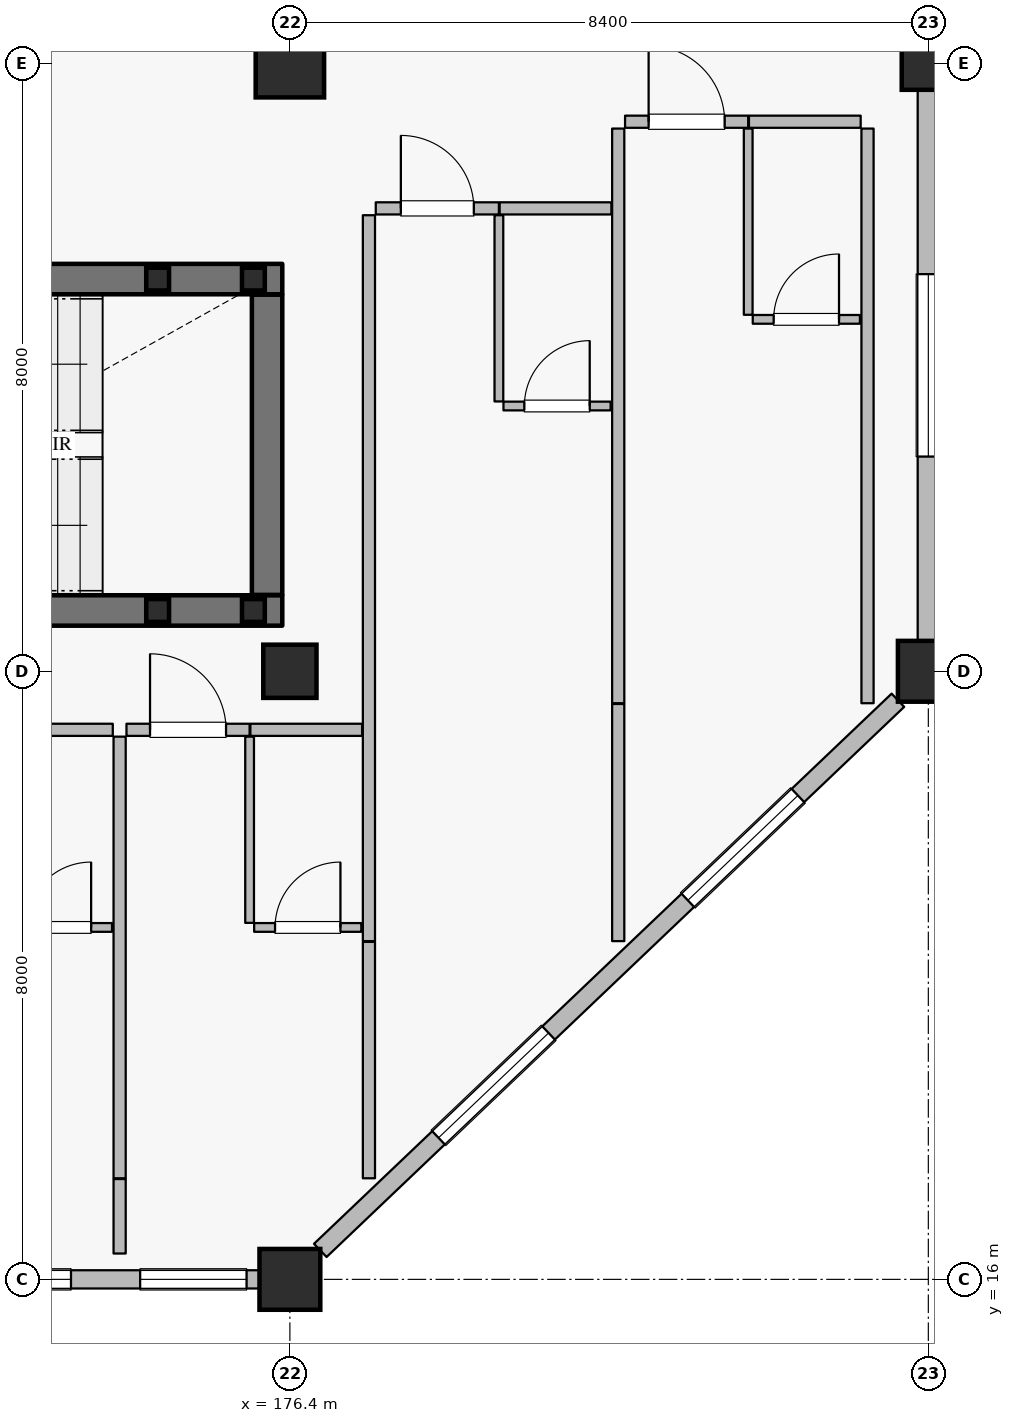
"""IFC4 building model, lengths in metres.
Left out: names, types, materials, properties, quantities, classifications, styles, units other than length and angle.
Written with IfcOpenShell. Run it as: python <this file> out.ifc"""

import sys

from ifc_helpers import new_model, si_unit, direction, frame, frame_2d, origin, origin_2d, place, context, subcontext, project, spatial, rectangle, hollow_rectangle, extrude, element, fill, save


model = new_model("IFC4")
c1 = context("Model", 3, precision=1e-05, world=origin(), true_north=direction((0.0, 1.0)))
c2 = subcontext(c1, "Body", "Model", "MODEL_VIEW")
j1 = project(units=[si_unit("LENGTHUNIT", "METRE"), si_unit("PLANEANGLEUNIT", "RADIAN")], contexts=[c1])
p1 = place(None, origin())
s1 = spatial("IfcSite", under=j1, at=p1, CompositionType="ELEMENT")
p2 = place(p1, origin())
s2 = spatial("IfcBuilding", under=s1, at=p2, CompositionType="ELEMENT")
p3 = place(p2, frame((0.0, 0.0, 16.2)))
s3 = spatial("IfcBuildingStorey", under=s2, at=p3, CompositionType="ELEMENT", Elevation=16.2)
p4 = place(p3, frame((176.4, 16.0, 0.0), z_axis=(0.0, 0.0, 1.0), x_axis=(1.0, 0.0, 0.0)))
e1 = element("IfcColumn", 1, at=p4, inside=s3, PredefinedType="COLUMN", context=c2, shape_type="SweptSolid", body=[
    extrude(rectangle(XDim=0.8, YDim=0.8, at=origin_2d()), origin(), (0.0, 0.0, 1.0), 4.8),
])
p5 = place(p3, frame((176.4, 32.0, 0.0), z_axis=(0.0, 0.0, 1.0), x_axis=(1.0, 0.0, 0.0)))
e2 = element("IfcColumn", 2, at=p5, inside=s3, PredefinedType="COLUMN", context=c2, shape_type="SweptSolid", body=[
    extrude(rectangle(XDim=0.9, YDim=0.9, at=origin_2d()), origin(), (0.0, 0.0, 1.0), 4.8),
])
p6 = place(p3, frame((184.8, 24.0, 0.0), z_axis=(0.0, 0.0, 1.0), x_axis=(1.0, 0.0, 0.0)))
e3 = element("IfcColumn", 3, at=p6, inside=s3, PredefinedType="COLUMN", context=c2, shape_type="SweptSolid", body=[
    extrude(rectangle(XDim=0.8, YDim=0.8, at=origin_2d()), origin(), (0.0, 0.0, 1.0), 4.8),
])
for number, where, z_axis, x_axis in (
    (4, (176.4, 24.0, 0.0), (0.0, 0.0, 1.0), (1.0, 0.0, 0.0)),
    (5, (184.8, 32.0, 0.0), (0.0, 0.0, 1.0), (1.0, 0.0, 0.0)),
):
    element("IfcColumn", number, at=place(p3, frame(where, z_axis=z_axis, x_axis=x_axis)), inside=s3, PredefinedType="COLUMN", context=c2, shape_type="SweptSolid", body=[
        extrude(rectangle(XDim=0.7, YDim=0.7, at=origin_2d()), origin(), (0.0, 0.0, 1.0), 4.8),
    ])
p7 = place(p3, frame((176.0, 16.0, 0.0), z_axis=(0.0, 0.0, 1.0), x_axis=(-1.0, 0.0, 0.0)))
e6 = element("IfcWall", 6, at=p7, inside=s3, PredefinedType="SOLIDWALL", context=c2, shape_type="SweptSolid", body=[
    extrude(rectangle(XDim=7.6, YDim=0.24, at=frame_2d((3.8, 0.0))), origin(), (0.0, 0.0, 1.0), 4.13),
])
p8 = place(p7, frame((0.17, 0.0, 0.8)))
e7 = element("IfcOpeningElement", 7, at=p8, cuts=e6, PredefinedType="OPENING", context=c2, shape_type="SweptSolid", body=[
    extrude(rectangle(XDim=1.4, YDim=1.6, at=frame_2d((0.7, 0.8))), frame((0.0, 0.13, 0.0), z_axis=(0.0, -1.0, 0.0), x_axis=(1.0, 0.0, 0.0)), (0.0, 0.0, 1.0), 0.26),
])
p9 = place(p7, frame((2.48, 0.0, 0.8)))
e8 = element("IfcOpeningElement", 8, at=p9, cuts=e6, PredefinedType="OPENING", context=c2, shape_type="SweptSolid", body=[
    extrude(rectangle(XDim=2.0, YDim=1.75, at=frame_2d((1.0, 0.875))), frame((0.0, 0.13, 0.0), z_axis=(0.0, -1.0, 0.0), x_axis=(1.0, 0.0, 0.0)), (0.0, 0.0, 1.0), 0.26),
])
p10 = place(p7, frame((5.41, 0.0, 0.8)))
e9 = element("IfcOpeningElement", 9, at=p10, cuts=e6, PredefinedType="OPENING", context=c2, shape_type="SweptSolid", body=[
    extrude(rectangle(XDim=2.0, YDim=1.75, at=frame_2d((1.0, 0.875))), frame((0.0, 0.13, 0.0), z_axis=(0.0, -1.0, 0.0), x_axis=(1.0, 0.0, 0.0)), (0.0, 0.0, 1.0), 0.26),
])
p11 = place(p3, frame((184.4, 23.619, 0.0), z_axis=(0.0, 0.0, 1.0), x_axis=(-0.724145676014, -0.689647040094, 0.0)))
e10 = element("IfcWall", 10, at=p11, inside=s3, PredefinedType="SOLIDWALL", context=c2, shape_type="SweptSolid", body=[
    extrude(rectangle(XDim=10.495, YDim=0.24, at=frame_2d((5.248, 0.0))), origin(), (0.0, 0.0, 1.0), 4.13),
])
p12 = place(p11, frame((1.817, 0.0, 0.8)))
e11 = element("IfcOpeningElement", 11, at=p12, cuts=e10, PredefinedType="OPENING", context=c2, shape_type="SweptSolid", body=[
    extrude(rectangle(XDim=2.0, YDim=1.75, at=frame_2d((1.0, 0.875))), frame((0.0, 0.13, 0.0), z_axis=(0.0, -1.0, 0.0), x_axis=(1.0, 0.0, 0.0)), (0.0, 0.0, 1.0), 0.26),
])
p13 = place(p11, frame((6.347, 0.0, 0.8)))
e12 = element("IfcOpeningElement", 12, at=p13, cuts=e10, PredefinedType="OPENING", context=c2, shape_type="SweptSolid", body=[
    extrude(rectangle(XDim=2.0, YDim=1.75, at=frame_2d((1.0, 0.875))), frame((0.0, 0.13, 0.0), z_axis=(0.0, -1.0, 0.0), x_axis=(1.0, 0.0, 0.0)), (0.0, 0.0, 1.0), 0.26),
])
p14 = place(p3, frame((184.8, 31.65, 0.0), z_axis=(0.0, 0.0, 1.0), x_axis=(0.0, -1.0, 0.0)))
e13 = element("IfcWall", 13, at=p14, inside=s3, PredefinedType="SOLIDWALL", context=c2, shape_type="SweptSolid", body=[
    extrude(rectangle(XDim=7.25, YDim=0.28, at=frame_2d((3.625, 0.0))), origin(), (0.0, 0.0, 1.0), 3.9),
])
p15 = place(p14, frame((2.425, 0.0, 0.75)))
e14 = element("IfcOpeningElement", 14, at=p15, cuts=e13, PredefinedType="OPENING", context=c2, shape_type="SweptSolid", body=[
    extrude(rectangle(XDim=2.4, YDim=1.65, at=frame_2d((1.2, 0.825))), frame((0.0, 0.15, 0.0), z_axis=(0.0, -1.0, 0.0), x_axis=(1.0, 0.0, 0.0)), (0.0, 0.0, 1.0), 0.3),
])
p16 = place(p3, frame((168.1, 24.8, 0.0), z_axis=(0.0, 0.0, 1.0), x_axis=(1.0, 0.0, 0.0)))
e15 = element("IfcWall", 15, at=p16, inside=s3, PredefinedType="SHEAR", context=c2, shape_type="SweptSolid", body=[
    extrude(rectangle(XDim=8.2, YDim=0.4, at=frame_2d((4.1, 0.0))), origin(), (0.0, 0.0, 1.0), 4.535),
])
p17 = place(p3, frame((176.1, 25.005, 0.0), z_axis=(0.0, 0.0, 1.0), x_axis=(0.0, 1.0, 0.0)))
e16 = element("IfcWall", 16, at=p17, inside=s3, PredefinedType="SHEAR", context=c2, shape_type="SweptSolid", body=[
    extrude(rectangle(XDim=3.95, YDim=0.4, at=frame_2d((1.975, 0.0))), origin(), (0.0, 0.0, 1.0), 4.535),
])
p18 = place(p3, frame((168.1, 29.16, 0.0), z_axis=(0.0, 0.0, 1.0), x_axis=(1.0, 0.0, 0.0)))
e17 = element("IfcWall", 17, at=p18, inside=s3, PredefinedType="SHEAR", context=c2, shape_type="SweptSolid", body=[
    extrude(rectangle(XDim=8.2, YDim=0.4, at=frame_2d((4.1, 0.0))), origin(), (0.0, 0.0, 1.0), 4.535),
])
p19 = place(p18, frame((0.43, 0.0, 0.0)))
e18 = element("IfcOpeningElement", 18, at=p19, cuts=e17, PredefinedType="OPENING", context=c2, shape_type="SweptSolid", body=[
    extrude(rectangle(XDim=1.16, YDim=2.2, at=frame_2d((0.58, 1.1))), frame((0.0, 0.21, 0.0), z_axis=(0.0, -1.0, 0.0), x_axis=(1.0, 0.0, 0.0)), (0.0, 0.0, 1.0), 0.42),
])
for number, where, z_axis, x_axis in (
    (19, (174.66, 24.8, -2.4), (0.0, 0.0, 1.0), (1.0, 0.0, 0.0)),
    (20, (174.66, 29.16, -2.4), (0.0, 0.0, 1.0), (1.0, 0.0, 0.0)),
    (21, (175.92, 24.8, -2.4), (0.0, 0.0, 1.0), (1.0, 0.0, 0.0)),
    (22, (175.92, 29.16, -2.4), (0.0, 0.0, 1.0), (1.0, 0.0, 0.0)),
):
    element("IfcColumn", number, at=place(p3, frame(where, z_axis=z_axis, x_axis=x_axis)), inside=s3, PredefinedType="COLUMN", context=c2, shape_type="SweptSolid", body=[
        extrude(hollow_rectangle(XDim=0.3, YDim=0.3, WallThickness=0.012, at=origin_2d()), origin(), (0.0, 0.0, 1.0), 4.62),
    ])
p20 = place(p3, frame((172.6, 23.23, 0.0), z_axis=(0.0, 0.0, 1.0), x_axis=(1.0, 0.0, 0.0)))
e23 = element("IfcWall", 23, at=p20, inside=s3, PredefinedType="PARTITIONING", context=c2, shape_type="SweptSolid", body=[
    extrude(rectangle(XDim=1.47, YDim=0.16, at=frame_2d((0.735, 0.0))), origin(), (0.0, 0.0, 1.0), 4.535),
])
p21 = place(p3, frame((172.65, 20.63, 0.0), z_axis=(0.0, 0.0, 1.0), x_axis=(1.0, 0.0, 0.0)))
e24 = element("IfcWall", 24, at=p21, inside=s3, PredefinedType="PARTITIONING", context=c2, shape_type="SweptSolid", body=[
    extrude(rectangle(XDim=1.41, YDim=0.115, at=frame_2d((0.705, 0.0))), origin(), (0.0, 0.0, 1.0), 4.535),
])
p22 = place(p21, frame((0.275, 0.0, 0.0)))
e25 = element("IfcOpeningElement", 25, at=p22, cuts=e24, PredefinedType="OPENING", context=c2, shape_type="SweptSolid", body=[
    extrude(rectangle(XDim=0.86, YDim=2.12, at=frame_2d((0.43, 1.06))), frame((0.0, 0.067, 0.0), z_axis=(0.0, -1.0, 0.0), x_axis=(1.0, 0.0, 0.0)), (0.0, 0.0, 1.0), 0.135),
])
p23 = place(p3, frame((174.16, 16.34, 0.0), z_axis=(0.0, 0.0, 1.0), x_axis=(0.0, 1.0, 0.0)))
e26 = element("IfcWall", 26, at=p23, inside=s3, PredefinedType="PARTITIONING", context=c2, shape_type="SweptSolid", body=[
    extrude(rectangle(XDim=0.98, YDim=0.16, at=frame_2d((0.49, 0.0))), origin(), (0.0, 0.0, 1.0), 4.535),
])
p24 = place(p3, frame((174.25, 23.23, 0.0), z_axis=(0.0, 0.0, 1.0), x_axis=(1.0, 0.0, 0.0)))
e27 = element("IfcWall", 27, at=p24, inside=s3, PredefinedType="PARTITIONING", context=c2, shape_type="SweptSolid", body=[
    extrude(rectangle(XDim=1.62, YDim=0.16, at=frame_2d((0.81, 0.0))), origin(), (0.0, 0.0, 1.0), 4.535),
])
p25 = place(p24, frame((0.31, 0.0, 0.0)))
e28 = element("IfcOpeningElement", 28, at=p25, cuts=e27, PredefinedType="OPENING", context=c2, shape_type="SweptSolid", body=[
    extrude(rectangle(XDim=1.0, YDim=2.25, at=frame_2d((0.5, 1.125))), frame((0.0, 0.09, 0.0), z_axis=(0.0, -1.0, 0.0), x_axis=(1.0, 0.0, 0.0)), (0.0, 0.0, 1.0), 0.18),
])
p26 = place(p3, frame((175.88, 23.23, 0.0), z_axis=(0.0, 0.0, 1.0), x_axis=(1.0, 0.0, 0.0)))
e29 = element("IfcWall", 29, at=p26, inside=s3, PredefinedType="PARTITIONING", context=c2, shape_type="SweptSolid", body=[
    extrude(rectangle(XDim=1.47, YDim=0.16, at=frame_2d((0.735, 0.0))), origin(), (0.0, 0.0, 1.0), 4.535),
])
p27 = place(p3, frame((175.87, 20.69, 0.0), z_axis=(0.0, 0.0, 1.0), x_axis=(0.0, 1.0, 0.0)))
e30 = element("IfcWall", 30, at=p27, inside=s3, PredefinedType="PARTITIONING", context=c2, shape_type="SweptSolid", body=[
    extrude(rectangle(XDim=2.45, YDim=0.115, at=frame_2d((1.225, 0.0))), origin(), (0.0, 0.0, 1.0), 4.535),
])
p28 = place(p3, frame((175.93, 20.63, 0.0), z_axis=(0.0, 0.0, 1.0), x_axis=(1.0, 0.0, 0.0)))
e31 = element("IfcWall", 31, at=p28, inside=s3, PredefinedType="PARTITIONING", context=c2, shape_type="SweptSolid", body=[
    extrude(rectangle(XDim=1.41, YDim=0.115, at=frame_2d((0.705, 0.0))), origin(), (0.0, 0.0, 1.0), 4.535),
])
p29 = place(p28, frame((0.275, 0.0, 0.0)))
e32 = element("IfcOpeningElement", 32, at=p29, cuts=e31, PredefinedType="OPENING", context=c2, shape_type="SweptSolid", body=[
    extrude(rectangle(XDim=0.86, YDim=2.12, at=frame_2d((0.43, 1.06))), frame((0.0, 0.067, 0.0), z_axis=(0.0, -1.0, 0.0), x_axis=(1.0, 0.0, 0.0)), (0.0, 0.0, 1.0), 0.135),
])
p30 = place(p3, frame((174.16, 17.33, 0.0), z_axis=(0.0, 0.0, 1.0), x_axis=(0.0, 1.0, 0.0)))
e33 = element("IfcWall", 33, at=p30, inside=s3, PredefinedType="PARTITIONING", context=c2, shape_type="SweptSolid", body=[
    extrude(rectangle(XDim=5.81, YDim=0.16, at=frame_2d((2.905, 0.0))), origin(), (0.0, 0.0, 1.0), 4.535),
])
p31 = place(p3, frame((177.44, 17.33, 0.0), z_axis=(0.0, 0.0, 1.0), x_axis=(0.0, 1.0, 0.0)))
e34 = element("IfcWall", 34, at=p31, inside=s3, PredefinedType="PARTITIONING", context=c2, shape_type="SweptSolid", body=[
    extrude(rectangle(XDim=3.11, YDim=0.16, at=frame_2d((1.555, 0.0))), origin(), (0.0, 0.0, 1.0), 4.535),
])
p32 = place(p3, frame((177.53, 30.09, 0.0), z_axis=(0.0, 0.0, 1.0), x_axis=(1.0, 0.0, 0.0)))
e35 = element("IfcWall", 35, at=p32, inside=s3, PredefinedType="PARTITIONING", context=c2, shape_type="SweptSolid", body=[
    extrude(rectangle(XDim=1.62, YDim=0.16, at=frame_2d((0.81, 0.0))), origin(), (0.0, 0.0, 1.0), 4.535),
])
p33 = place(p32, frame((0.33, 0.0, 0.0)))
e36 = element("IfcOpeningElement", 36, at=p33, cuts=e35, PredefinedType="OPENING", context=c2, shape_type="SweptSolid", body=[
    extrude(rectangle(XDim=0.96, YDim=2.2, at=frame_2d((0.48, 1.1))), frame((0.0, 0.09, 0.0), z_axis=(0.0, -1.0, 0.0), x_axis=(1.0, 0.0, 0.0)), (0.0, 0.0, 1.0), 0.18),
])
p34 = place(p3, frame((179.16, 30.09, 0.0), z_axis=(0.0, 0.0, 1.0), x_axis=(1.0, 0.0, 0.0)))
e37 = element("IfcWall", 37, at=p34, inside=s3, PredefinedType="PARTITIONING", context=c2, shape_type="SweptSolid", body=[
    extrude(rectangle(XDim=1.47, YDim=0.16, at=frame_2d((0.735, 0.0))), origin(), (0.0, 0.0, 1.0), 4.535),
])
p35 = place(p3, frame((179.15, 27.55, 0.0), z_axis=(0.0, 0.0, 1.0), x_axis=(0.0, 1.0, 0.0)))
e38 = element("IfcWall", 38, at=p35, inside=s3, PredefinedType="PARTITIONING", context=c2, shape_type="SweptSolid", body=[
    extrude(rectangle(XDim=2.45, YDim=0.115, at=frame_2d((1.225, 0.0))), origin(), (0.0, 0.0, 1.0), 4.535),
])
p36 = place(p3, frame((179.21, 27.49, 0.0), z_axis=(0.0, 0.0, 1.0), x_axis=(1.0, 0.0, 0.0)))
e39 = element("IfcWall", 39, at=p36, inside=s3, PredefinedType="PARTITIONING", context=c2, shape_type="SweptSolid", body=[
    extrude(rectangle(XDim=1.41, YDim=0.115, at=frame_2d((0.705, 0.0))), origin(), (0.0, 0.0, 1.0), 4.535),
])
p37 = place(p36, frame((0.275, 0.0, 0.0)))
e40 = element("IfcOpeningElement", 40, at=p37, cuts=e39, PredefinedType="OPENING", context=c2, shape_type="SweptSolid", body=[
    extrude(rectangle(XDim=0.86, YDim=2.12, at=frame_2d((0.43, 1.06))), frame((0.0, 0.067, 0.0), z_axis=(0.0, -1.0, 0.0), x_axis=(1.0, 0.0, 0.0)), (0.0, 0.0, 1.0), 0.135),
])
p38 = place(p3, frame((177.44, 20.45, 0.0), z_axis=(0.0, 0.0, 1.0), x_axis=(0.0, 1.0, 0.0)))
e41 = element("IfcWall", 41, at=p38, inside=s3, PredefinedType="PARTITIONING", context=c2, shape_type="SweptSolid", body=[
    extrude(rectangle(XDim=9.55, YDim=0.16, at=frame_2d((4.775, 0.0))), origin(), (0.0, 0.0, 1.0), 4.535),
])
p39 = place(p3, frame((180.72, 20.45, 0.0), z_axis=(0.0, 0.0, 1.0), x_axis=(0.0, 1.0, 0.0)))
e42 = element("IfcWall", 42, at=p39, inside=s3, PredefinedType="PARTITIONING", context=c2, shape_type="SweptSolid", body=[
    extrude(rectangle(XDim=3.12, YDim=0.16, at=frame_2d((1.56, 0.0))), origin(), (0.0, 0.0, 1.0), 4.535),
])
p40 = place(p3, frame((180.81, 31.23, 0.0), z_axis=(0.0, 0.0, 1.0), x_axis=(1.0, 0.0, 0.0)))
e43 = element("IfcWall", 43, at=p40, inside=s3, PredefinedType="PARTITIONING", context=c2, shape_type="SweptSolid", body=[
    extrude(rectangle(XDim=1.62, YDim=0.16, at=frame_2d((0.81, 0.0))), origin(), (0.0, 0.0, 1.0), 4.535),
])
p41 = place(p40, frame((0.31, 0.0, 0.0)))
e44 = element("IfcOpeningElement", 44, at=p41, cuts=e43, PredefinedType="OPENING", context=c2, shape_type="SweptSolid", body=[
    extrude(rectangle(XDim=1.0, YDim=2.25, at=frame_2d((0.5, 1.125))), frame((0.0, 0.09, 0.0), z_axis=(0.0, -1.0, 0.0), x_axis=(1.0, 0.0, 0.0)), (0.0, 0.0, 1.0), 0.18),
])
p42 = place(p3, frame((182.44, 31.23, 0.0), z_axis=(0.0, 0.0, 1.0), x_axis=(1.0, 0.0, 0.0)))
e45 = element("IfcWall", 45, at=p42, inside=s3, PredefinedType="PARTITIONING", context=c2, shape_type="SweptSolid", body=[
    extrude(rectangle(XDim=1.47, YDim=0.16, at=frame_2d((0.735, 0.0))), origin(), (0.0, 0.0, 1.0), 4.535),
])
p43 = place(p3, frame((182.43, 28.69, 0.0), z_axis=(0.0, 0.0, 1.0), x_axis=(0.0, 1.0, 0.0)))
e46 = element("IfcWall", 46, at=p43, inside=s3, PredefinedType="PARTITIONING", context=c2, shape_type="SweptSolid", body=[
    extrude(rectangle(XDim=2.45, YDim=0.115, at=frame_2d((1.225, 0.0))), origin(), (0.0, 0.0, 1.0), 4.535),
])
p44 = place(p3, frame((182.49, 28.63, 0.0), z_axis=(0.0, 0.0, 1.0), x_axis=(1.0, 0.0, 0.0)))
e47 = element("IfcWall", 47, at=p44, inside=s3, PredefinedType="PARTITIONING", context=c2, shape_type="SweptSolid", body=[
    extrude(rectangle(XDim=1.41, YDim=0.115, at=frame_2d((0.705, 0.0))), origin(), (0.0, 0.0, 1.0), 4.535),
])
p45 = place(p44, frame((0.275, 0.0, 0.0)))
e48 = element("IfcOpeningElement", 48, at=p45, cuts=e47, PredefinedType="OPENING", context=c2, shape_type="SweptSolid", body=[
    extrude(rectangle(XDim=0.86, YDim=2.12, at=frame_2d((0.43, 1.06))), frame((0.0, 0.067, 0.0), z_axis=(0.0, -1.0, 0.0), x_axis=(1.0, 0.0, 0.0)), (0.0, 0.0, 1.0), 0.135),
])
for number, where, z_axis, x_axis in (
    (49, (180.72, 23.58, 0.0), (0.0, 0.0, 1.0), (0.0, 1.0, 0.0)),
    (50, (184.0, 23.58, 0.0), (0.0, 0.0, 1.0), (0.0, 1.0, 0.0)),
):
    element("IfcWall", number, at=place(p3, frame(where, z_axis=z_axis, x_axis=x_axis)), inside=s3, PredefinedType="PARTITIONING", context=c2, shape_type="SweptSolid", body=[
        extrude(rectangle(XDim=7.56, YDim=0.16, at=frame_2d((3.78, 0.0))), origin(), (0.0, 0.0, 1.0), 4.535),
    ])
p46 = place(p8, origin())
e51 = element("IfcWindow", 51, at=p46, inside=s3, PartitioningType="SINGLE_PANEL", PredefinedType="WINDOW", context=c2, shape_type="SweptSolid", body=[
    extrude(rectangle(XDim=1.4, YDim=1.6, at=frame_2d((0.7, 0.8))), frame((0.0, 0.03, 0.0), z_axis=(0.0, -1.0, 0.0), x_axis=(1.0, 0.0, 0.0)), (0.0, 0.0, 1.0), 0.06),
])
fill(e7, e51)
p47 = place(p9, origin())
e52 = element("IfcWindow", 52, at=p47, inside=s3, PartitioningType="DOUBLE_PANEL_VERTICAL", PredefinedType="WINDOW", context=c2, shape_type="SweptSolid", body=[
    extrude(rectangle(XDim=2.0, YDim=1.75, at=frame_2d((1.0, 0.875))), frame((0.0, 0.03, 0.0), z_axis=(0.0, -1.0, 0.0), x_axis=(1.0, 0.0, 0.0)), (0.0, 0.0, 1.0), 0.06),
])
fill(e8, e52)
p48 = place(p12, origin())
e53 = element("IfcWindow", 53, at=p48, inside=s3, PartitioningType="DOUBLE_PANEL_VERTICAL", PredefinedType="WINDOW", context=c2, shape_type="SweptSolid", body=[
    extrude(rectangle(XDim=2.0, YDim=1.75, at=frame_2d((1.0, 0.875))), frame((0.0, 0.03, 0.0), z_axis=(0.0, -1.0, 0.0), x_axis=(1.0, 0.0, 0.0)), (0.0, 0.0, 1.0), 0.06),
])
fill(e11, e53)
p49 = place(p13, origin())
e54 = element("IfcWindow", 54, at=p49, inside=s3, PartitioningType="DOUBLE_PANEL_VERTICAL", PredefinedType="WINDOW", context=c2, shape_type="SweptSolid", body=[
    extrude(rectangle(XDim=2.0, YDim=1.75, at=frame_2d((1.0, 0.875))), frame((0.0, 0.03, 0.0), z_axis=(0.0, -1.0, 0.0), x_axis=(1.0, 0.0, 0.0)), (0.0, 0.0, 1.0), 0.06),
])
fill(e12, e54)
p50 = place(p15, origin())
e55 = element("IfcWindow", 55, at=p50, inside=s3, PartitioningType="DOUBLE_PANEL_VERTICAL", PredefinedType="WINDOW", context=c2, shape_type="SweptSolid", body=[
    extrude(rectangle(XDim=2.4, YDim=1.65, at=frame_2d((1.2, 0.825))), frame((0.0, 0.03, 0.0), z_axis=(0.0, -1.0, 0.0), x_axis=(1.0, 0.0, 0.0)), (0.0, 0.0, 1.0), 0.06),
])
fill(e14, e55)
p51 = place(p22, origin())
e56 = element("IfcDoor", 56, at=p51, inside=s3, OperationType="SINGLE_SWING_RIGHT", PredefinedType="DOOR", context=c2, shape_type="SweptSolid", body=[
    extrude(rectangle(XDim=0.86, YDim=2.12, at=frame_2d((0.43, 1.06))), frame((0.0, 0.025, 0.0), z_axis=(0.0, -1.0, 0.0), x_axis=(1.0, 0.0, 0.0)), (0.0, 0.0, 1.0), 0.05),
])
fill(e25, e56)
p52 = place(p25, origin())
e57 = element("IfcDoor", 57, at=p52, inside=s3, OperationType="SINGLE_SWING_LEFT", PredefinedType="DOOR", context=c2, shape_type="SweptSolid", body=[
    extrude(rectangle(XDim=1.0, YDim=2.25, at=frame_2d((0.5, 1.125))), frame((0.0, 0.025, 0.0), z_axis=(0.0, -1.0, 0.0), x_axis=(1.0, 0.0, 0.0)), (0.0, 0.0, 1.0), 0.05),
])
fill(e28, e57)
p53 = place(p29, origin())
e58 = element("IfcDoor", 58, at=p53, inside=s3, OperationType="SINGLE_SWING_RIGHT", PredefinedType="DOOR", context=c2, shape_type="SweptSolid", body=[
    extrude(rectangle(XDim=0.86, YDim=2.12, at=frame_2d((0.43, 1.06))), frame((0.0, 0.025, 0.0), z_axis=(0.0, -1.0, 0.0), x_axis=(1.0, 0.0, 0.0)), (0.0, 0.0, 1.0), 0.05),
])
fill(e32, e58)
p54 = place(p33, origin())
e59 = element("IfcDoor", 59, at=p54, inside=s3, OperationType="SINGLE_SWING_LEFT", PredefinedType="DOOR", context=c2, shape_type="SweptSolid", body=[
    extrude(rectangle(XDim=0.96, YDim=2.2, at=frame_2d((0.48, 1.1))), frame((0.0, 0.025, 0.0), z_axis=(0.0, -1.0, 0.0), x_axis=(1.0, 0.0, 0.0)), (0.0, 0.0, 1.0), 0.05),
])
fill(e36, e59)
p55 = place(p37, origin())
e60 = element("IfcDoor", 60, at=p55, inside=s3, OperationType="SINGLE_SWING_RIGHT", PredefinedType="DOOR", context=c2, shape_type="SweptSolid", body=[
    extrude(rectangle(XDim=0.86, YDim=2.12, at=frame_2d((0.43, 1.06))), frame((0.0, 0.025, 0.0), z_axis=(0.0, -1.0, 0.0), x_axis=(1.0, 0.0, 0.0)), (0.0, 0.0, 1.0), 0.05),
])
fill(e40, e60)
p56 = place(p41, origin())
e61 = element("IfcDoor", 61, at=p56, inside=s3, OperationType="SINGLE_SWING_LEFT", PredefinedType="DOOR", context=c2, shape_type="SweptSolid", body=[
    extrude(rectangle(XDim=1.0, YDim=2.25, at=frame_2d((0.5, 1.125))), frame((0.0, 0.025, 0.0), z_axis=(0.0, -1.0, 0.0), x_axis=(1.0, 0.0, 0.0)), (0.0, 0.0, 1.0), 0.05),
])
fill(e44, e61)
p57 = place(p45, origin())
e62 = element("IfcDoor", 62, at=p57, inside=s3, OperationType="SINGLE_SWING_RIGHT", PredefinedType="DOOR", context=c2, shape_type="SweptSolid", body=[
    extrude(rectangle(XDim=0.86, YDim=2.12, at=frame_2d((0.43, 1.06))), frame((0.0, 0.025, 0.0), z_axis=(0.0, -1.0, 0.0), x_axis=(1.0, 0.0, 0.0)), (0.0, 0.0, 1.0), 0.05),
])
fill(e48, e62)
save(model, sys.argv[1])
